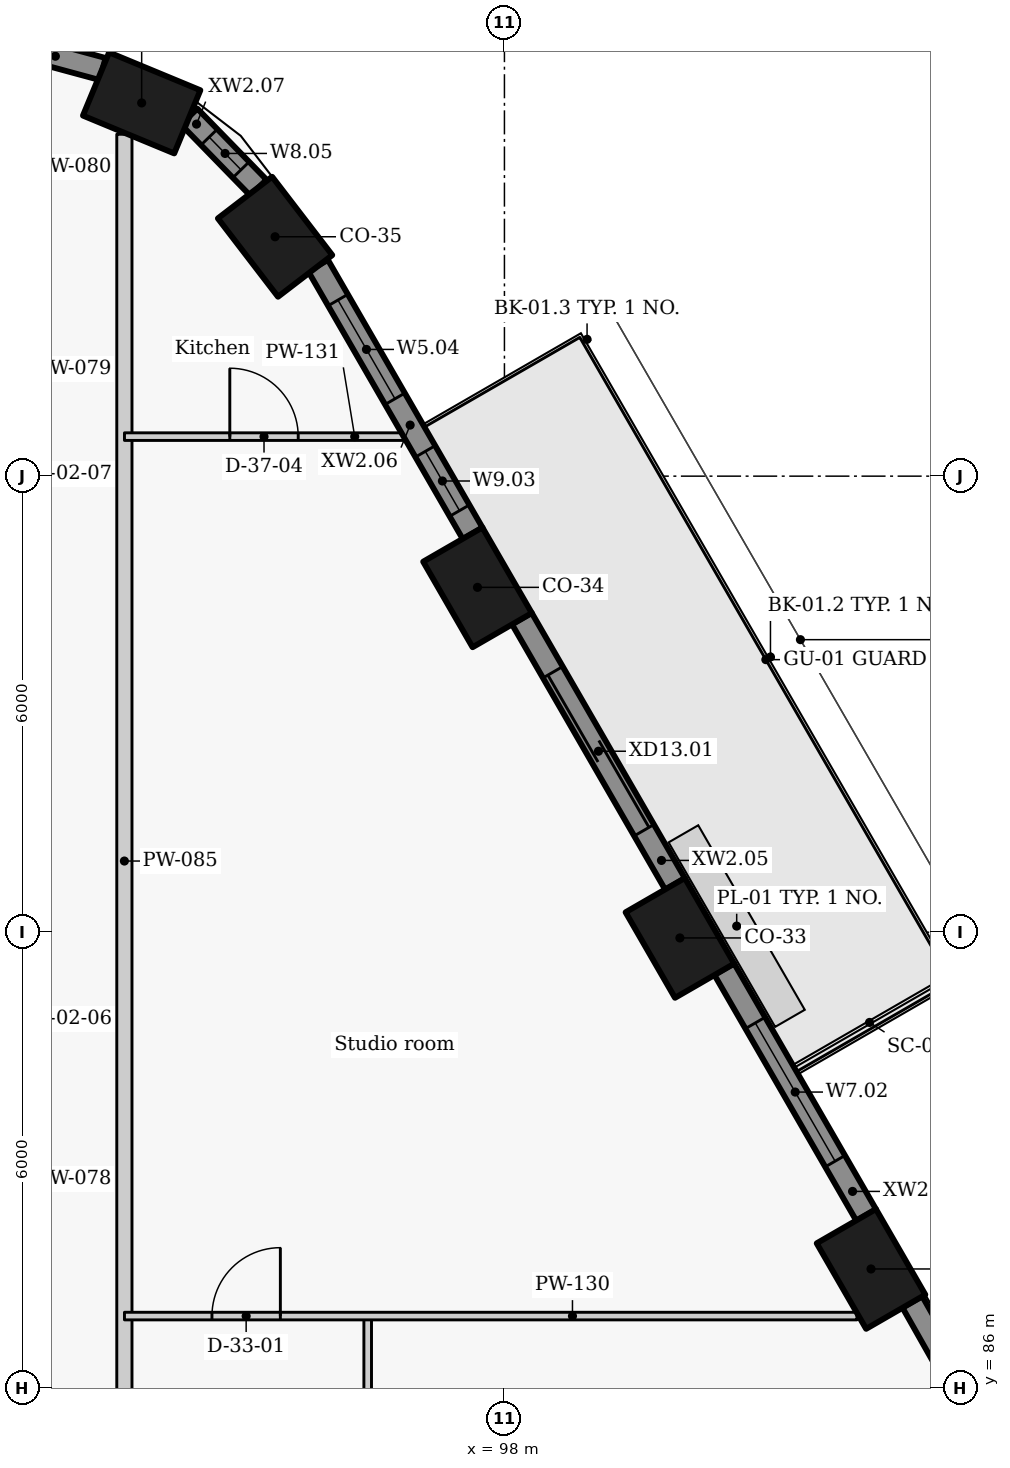
"""IFC4 building model, lengths in metres.
Left out: names, types, materials, properties, quantities, classifications, styles, units other than length and angle.
Written with IfcOpenShell. Run it as: python <this file> out.ifc"""

import sys

from ifc_helpers import new_model, si_unit, direction, frame, frame_2d, origin, origin_2d, place, context, subcontext, project, spatial, rectangle, extrude, element, fill, save


model = new_model("IFC4")
c1 = context("Model", 3, precision=1e-05, world=origin(), true_north=direction((0.0, 1.0)))
c2 = subcontext(c1, "Body", "Model", "MODEL_VIEW")
j1 = project(units=[si_unit("LENGTHUNIT", "METRE"), si_unit("PLANEANGLEUNIT", "RADIAN")], contexts=[c1])
p1 = place(None, origin())
s1 = spatial("IfcSite", under=j1, at=p1, CompositionType="ELEMENT")
p2 = place(p1, origin())
s2 = spatial("IfcBuilding", under=s1, at=p2, CompositionType="ELEMENT")
p3 = place(p2, frame((0.0, 0.0, 166.8)))
s3 = spatial("IfcBuildingStorey", under=s2, at=p3, CompositionType="ELEMENT", Elevation=166.8)
for number, where, z_axis, x_axis in (
    (1, (102.823, 87.57, 0.0), (0.0, 0.0, 1.0), (-0.5, 0.866, 0.0)),
    (2, (100.308, 91.925, 0.0), (0.0, 0.0, 1.0), (-0.5, 0.866, 0.0)),
    (3, (97.646, 96.537, 0.0), (0.0, 0.0, 1.0), (-0.5, 0.866, 0.0)),
    (4, (94.982, 101.149, 0.0), (0.0, 0.0, 1.0), (-0.609, 0.793, 0.0)),
    (5, (93.227, 102.91, 0.0), (0.0, 0.0, 1.0), (-0.924, 0.383, 0.0)),
):
    element("IfcColumn", number, at=place(p3, frame(where, z_axis=z_axis, x_axis=x_axis)), inside=s3, PredefinedType="COLUMN", context=c2, shape_type="SweptSolid", body=[
        extrude(rectangle(XDim=1.3, YDim=0.9, at=origin_2d()), origin(), (0.0, 0.0, 1.0), 3.3),
    ])
p4 = place(p3, frame((106.186, 82.153, 0.0), z_axis=(0.0, 0.0, 1.0), x_axis=(-0.492498306264, 0.87031340236, 0.0)))
e6 = element("IfcWall", 6, at=p4, inside=s3, PredefinedType="SOLIDWALL", context=c2, shape_type="SweptSolid", body=[
    extrude(rectangle(XDim=5.727, YDim=0.3, at=frame_2d((2.863, 0.0))), origin(), (0.0, 0.0, 1.0), 2.05),
])
p5 = place(p4, frame((2.604, 0.0, 0.9)))
e7 = element("IfcOpeningElement", 7, at=p5, cuts=e6, PredefinedType="OPENING", context=c2, shape_type="SweptSolid", body=[
    extrude(rectangle(XDim=2.1, YDim=1.1, at=frame_2d((1.05, 0.55))), frame((0.0, 0.16, 0.0), z_axis=(0.0, -1.0, 0.0), x_axis=(1.0, 0.0, 0.0)), (0.0, 0.0, 1.0), 0.32),
])
p6 = place(p3, frame((102.76, 88.279, 0.0), z_axis=(0.0, 0.0, 1.0), x_axis=(-0.499933594891, 0.866063739398, 0.0)))
e8 = element("IfcWall", 8, at=p6, inside=s3, PredefinedType="SOLIDWALL", context=c2, shape_type="SweptSolid", body=[
    extrude(rectangle(XDim=3.737, YDim=0.3, at=frame_2d((1.868, 0.0))), origin(), (0.0, 0.0, 1.0), 2.05),
])
p7 = place(p6, frame((0.818, 0.0, 0.9)))
e9 = element("IfcOpeningElement", 9, at=p7, cuts=e8, PredefinedType="OPENING", context=c2, shape_type="SweptSolid", body=[
    extrude(rectangle(XDim=2.1, YDim=1.1, at=frame_2d((1.05, 0.55))), frame((0.0, 0.16, 0.0), z_axis=(0.0, -1.0, 0.0), x_axis=(1.0, 0.0, 0.0)), (0.0, 0.0, 1.0), 0.32),
])
p8 = place(p3, frame((100.245, 92.634, 0.0), z_axis=(0.0, 0.0, 1.0), x_axis=(-0.500031546601, 0.86600718958, 0.0)))
e10 = element("IfcWall", 10, at=p8, inside=s3, PredefinedType="SOLIDWALL", context=c2, shape_type="SweptSolid", body=[
    extrude(rectangle(XDim=4.034, YDim=0.3, at=frame_2d((2.017, 0.0))), origin(), (0.0, 0.0, 1.0), 2.05),
])
p9 = place(p8, frame((0.817, 0.0, 0.0)))
e11 = element("IfcOpeningElement", 11, at=p9, cuts=e10, PredefinedType="OPENING", context=c2, shape_type="SweptSolid", body=[
    extrude(rectangle(XDim=2.4, YDim=2.0, at=frame_2d((1.2, 1.0))), frame((0.0, 0.16, 0.0), z_axis=(0.0, -1.0, 0.0), x_axis=(1.0, 0.0, 0.0)), (0.0, 0.0, 1.0), 0.32),
])
p10 = place(p3, frame((97.582, 97.247, 0.0), z_axis=(0.0, 0.0, 1.0), x_axis=(-0.500018589245, 0.866014671013, 0.0)))
e12 = element("IfcWall", 12, at=p10, inside=s3, PredefinedType="SOLIDWALL", context=c2, shape_type="SweptSolid", body=[
    extrude(rectangle(XDim=4.068, YDim=0.3, at=frame_2d((2.034, 0.0))), origin(), (0.0, 0.0, 1.0), 2.05),
])
p11 = place(p10, frame((0.346, 0.0, 0.9)))
e13 = element("IfcOpeningElement", 13, at=p11, cuts=e12, PredefinedType="OPENING", context=c2, shape_type="SweptSolid", body=[
    extrude(rectangle(XDim=0.9, YDim=1.1, at=frame_2d((0.45, 0.55))), frame((0.0, 0.16, 0.0), z_axis=(0.0, -1.0, 0.0), x_axis=(1.0, 0.0, 0.0)), (0.0, 0.0, 1.0), 0.32),
])
p12 = place(p10, frame((2.045, 0.0, 0.9)))
e14 = element("IfcOpeningElement", 14, at=p12, cuts=e12, PredefinedType="OPENING", context=c2, shape_type="SweptSolid", body=[
    extrude(rectangle(XDim=1.5, YDim=1.1, at=frame_2d((0.75, 0.55))), frame((0.0, 0.16, 0.0), z_axis=(0.0, -1.0, 0.0), x_axis=(1.0, 0.0, 0.0)), (0.0, 0.0, 1.0), 0.32),
])
p13 = place(p3, frame((94.763, 101.795, 0.0), z_axis=(0.0, 0.0, 1.0), x_axis=(-0.697598997785, 0.716488407645, 0.0)))
e15 = element("IfcWall", 15, at=p13, inside=s3, PredefinedType="SOLIDWALL", context=c2, shape_type="SweptSolid", body=[
    extrude(rectangle(XDim=1.305, YDim=0.3, at=frame_2d((0.653, 0.0))), origin(), (0.0, 0.0, 1.0), 2.05),
])
p14 = place(p13, frame((0.328, 0.0, 0.9)))
e16 = element("IfcOpeningElement", 16, at=p14, cuts=e15, PredefinedType="OPENING", context=c2, shape_type="SweptSolid", body=[
    extrude(rectangle(XDim=0.6, YDim=1.1, at=frame_2d((0.3, 0.55))), frame((0.0, 0.16, 0.0), z_axis=(0.0, -1.0, 0.0), x_axis=(1.0, 0.0, 0.0)), (0.0, 0.0, 1.0), 0.32),
])
p15 = place(p3, frame((92.713, 103.356, 0.0), z_axis=(0.0, 0.0, 1.0), x_axis=(-0.965274225809, 0.26123872031, 0.0)))
e17 = element("IfcWall", 17, at=p15, inside=s3, PredefinedType="SOLIDWALL", context=c2, shape_type="SweptSolid", body=[
    extrude(rectangle(XDim=1.287, YDim=0.3, at=frame_2d((0.644, 0.0))), origin(), (0.0, 0.0, 1.0), 2.05),
])
p16 = place(p3, frame((93.0, 102.498, 0.0), z_axis=(0.0, 0.0, 1.0), x_axis=(0.0, -1.0, 0.0)))
e18 = element("IfcWall", 18, at=p16, inside=s3, PredefinedType="PARTITIONING", context=c2, shape_type="SweptSolid", body=[
    extrude(rectangle(XDim=45.665, YDim=0.2, at=frame_2d((22.833, 0.0))), origin(), (0.0, 0.0, 1.0), 2.03),
])
p17 = place(p16, frame((37.581, 0.0, 0.0)))
e19 = element("IfcOpeningElement", 19, at=p17, cuts=e18, PredefinedType="OPENING", context=c2, shape_type="SweptSolid", body=[
    extrude(rectangle(XDim=1.0, YDim=2.01, at=frame_2d((0.5, 1.005))), frame((0.0, 0.11, 0.0), z_axis=(0.0, -1.0, 0.0), x_axis=(1.0, 0.0, 0.0)), (0.0, 0.0, 1.0), 0.22),
])
p18 = place(p16, frame((29.223, 0.0, 0.0)))
e20 = element("IfcOpeningElement", 20, at=p18, cuts=e18, PredefinedType="OPENING", context=c2, shape_type="SweptSolid", body=[
    extrude(rectangle(XDim=1.0, YDim=2.01, at=frame_2d((0.5, 1.005))), frame((0.0, 0.11, 0.0), z_axis=(0.0, -1.0, 0.0), x_axis=(1.0, 0.0, 0.0)), (0.0, 0.0, 1.0), 0.22),
])
p19 = place(p16, frame((19.223, 0.0, 0.0)))
e21 = element("IfcOpeningElement", 21, at=p19, cuts=e18, PredefinedType="OPENING", context=c2, shape_type="SweptSolid", body=[
    extrude(rectangle(XDim=1.0, YDim=2.01, at=frame_2d((0.5, 1.005))), frame((0.0, 0.11, 0.0), z_axis=(0.0, -1.0, 0.0), x_axis=(1.0, 0.0, 0.0)), (0.0, 0.0, 1.0), 0.22),
])
p20 = place(p3, frame((96.201, 83.55, 0.0), z_axis=(0.0, 0.0, 1.0), x_axis=(0.0, 1.0, 0.0)))
e22 = element("IfcWall", 22, at=p20, inside=s3, PredefinedType="PARTITIONING", context=c2, shape_type="SweptSolid", body=[
    extrude(rectangle(XDim=3.4, YDim=0.1, at=frame_2d((1.7, 0.0))), origin(), (0.0, 0.0, 1.0), 2.95),
])
p21 = place(p3, frame((93.001, 86.95, 0.0), z_axis=(0.0, 0.0, 1.0), x_axis=(1.0, 0.0, 0.0)))
e23 = element("IfcWall", 23, at=p21, inside=s3, PredefinedType="PARTITIONING", context=c2, shape_type="SweptSolid", body=[
    extrude(rectangle(XDim=9.637, YDim=0.1, at=frame_2d((4.818, 0.0))), origin(), (0.0, 0.0, 1.0), 2.95),
])
p22 = place(p21, frame((1.151, 0.0, 0.0)))
e24 = element("IfcOpeningElement", 24, at=p22, cuts=e23, PredefinedType="OPENING", context=c2, shape_type="SweptSolid", body=[
    extrude(rectangle(XDim=0.9, YDim=2.1, at=frame_2d((0.45, 1.05))), frame((0.0, 0.06, 0.0), z_axis=(0.0, -1.0, 0.0), x_axis=(1.0, 0.0, 0.0)), (0.0, 0.0, 1.0), 0.12),
])
p23 = place(p3, frame((93.001, 98.52, 0.0), z_axis=(0.0, 0.0, 1.0), x_axis=(1.0, 0.0, 0.0)))
e25 = element("IfcWall", 25, at=p23, inside=s3, PredefinedType="PARTITIONING", context=c2, shape_type="SweptSolid", body=[
    extrude(rectangle(XDim=3.673, YDim=0.1, at=frame_2d((1.836, 0.0))), origin(), (0.0, 0.0, 1.0), 2.03),
])
p24 = place(p23, frame((1.386, 0.0, 0.0)))
e26 = element("IfcOpeningElement", 26, at=p24, cuts=e25, PredefinedType="OPENING", context=c2, shape_type="SweptSolid", body=[
    extrude(rectangle(XDim=0.9, YDim=2.01, at=frame_2d((0.45, 1.005))), frame((0.0, 0.06, 0.0), z_axis=(0.0, -1.0, 0.0), x_axis=(1.0, 0.0, 0.0)), (0.0, 0.0, 1.0), 0.12),
])
p25 = place(p7, origin())
e27 = element("IfcWindow", 27, at=p25, inside=s3, PartitioningType="SINGLE_PANEL", PredefinedType="WINDOW", context=c2, shape_type="SweptSolid", body=[
    extrude(rectangle(XDim=2.1, YDim=1.1, at=frame_2d((1.05, 0.55))), frame((0.0, 0.03, 0.0), z_axis=(0.0, -1.0, 0.0), x_axis=(1.0, 0.0, 0.0)), (0.0, 0.0, 1.0), 0.06),
])
fill(e9, e27)
p26 = place(p9, origin())
e28 = element("IfcDoor", 28, at=p26, inside=s3, OperationType="DOUBLE_DOOR_SLIDING", PredefinedType="DOOR", context=c2, shape_type="SweptSolid", body=[
    extrude(rectangle(XDim=2.4, YDim=2.0, at=frame_2d((1.2, 1.0))), frame((0.0, 0.025, 0.0), z_axis=(0.0, -1.0, 0.0), x_axis=(1.0, 0.0, 0.0)), (0.0, 0.0, 1.0), 0.05),
])
fill(e11, e28)
p27 = place(p11, origin())
e29 = element("IfcWindow", 29, at=p27, inside=s3, PartitioningType="SINGLE_PANEL", PredefinedType="WINDOW", context=c2, shape_type="SweptSolid", body=[
    extrude(rectangle(XDim=0.9, YDim=1.1, at=frame_2d((0.45, 0.55))), frame((0.0, 0.03, 0.0), z_axis=(0.0, -1.0, 0.0), x_axis=(1.0, 0.0, 0.0)), (0.0, 0.0, 1.0), 0.06),
])
fill(e13, e29)
p28 = place(p12, origin())
e30 = element("IfcWindow", 30, at=p28, inside=s3, PartitioningType="SINGLE_PANEL", PredefinedType="WINDOW", context=c2, shape_type="SweptSolid", body=[
    extrude(rectangle(XDim=1.5, YDim=1.1, at=frame_2d((0.75, 0.55))), frame((0.0, 0.03, 0.0), z_axis=(0.0, -1.0, 0.0), x_axis=(1.0, 0.0, 0.0)), (0.0, 0.0, 1.0), 0.06),
])
fill(e14, e30)
p29 = place(p14, origin())
e31 = element("IfcWindow", 31, at=p29, inside=s3, PartitioningType="SINGLE_PANEL", PredefinedType="WINDOW", context=c2, shape_type="SweptSolid", body=[
    extrude(rectangle(XDim=0.6, YDim=1.1, at=frame_2d((0.3, 0.55))), frame((0.0, 0.03, 0.0), z_axis=(0.0, -1.0, 0.0), x_axis=(1.0, 0.0, 0.0)), (0.0, 0.0, 1.0), 0.06),
])
fill(e16, e31)
p30 = place(p22, origin())
e32 = element("IfcDoor", 32, at=p30, inside=s3, OperationType="SINGLE_SWING_RIGHT", PredefinedType="DOOR", context=c2, shape_type="SweptSolid", body=[
    extrude(rectangle(XDim=0.9, YDim=2.1, at=frame_2d((0.45, 1.05))), frame((0.0, 0.025, 0.0), z_axis=(0.0, -1.0, 0.0), x_axis=(1.0, 0.0, 0.0)), (0.0, 0.0, 1.0), 0.05),
])
fill(e24, e32)
p31 = place(p24, origin())
e33 = element("IfcDoor", 33, at=p31, inside=s3, OperationType="SINGLE_SWING_LEFT", PredefinedType="DOOR", context=c2, shape_type="SweptSolid", body=[
    extrude(rectangle(XDim=0.9, YDim=2.01, at=frame_2d((0.45, 1.005))), frame((0.0, 0.025, 0.0), z_axis=(0.0, -1.0, 0.0), x_axis=(1.0, 0.0, 0.0)), (0.0, 0.0, 1.0), 0.05),
])
fill(e26, e33)
save(model, sys.argv[1])
